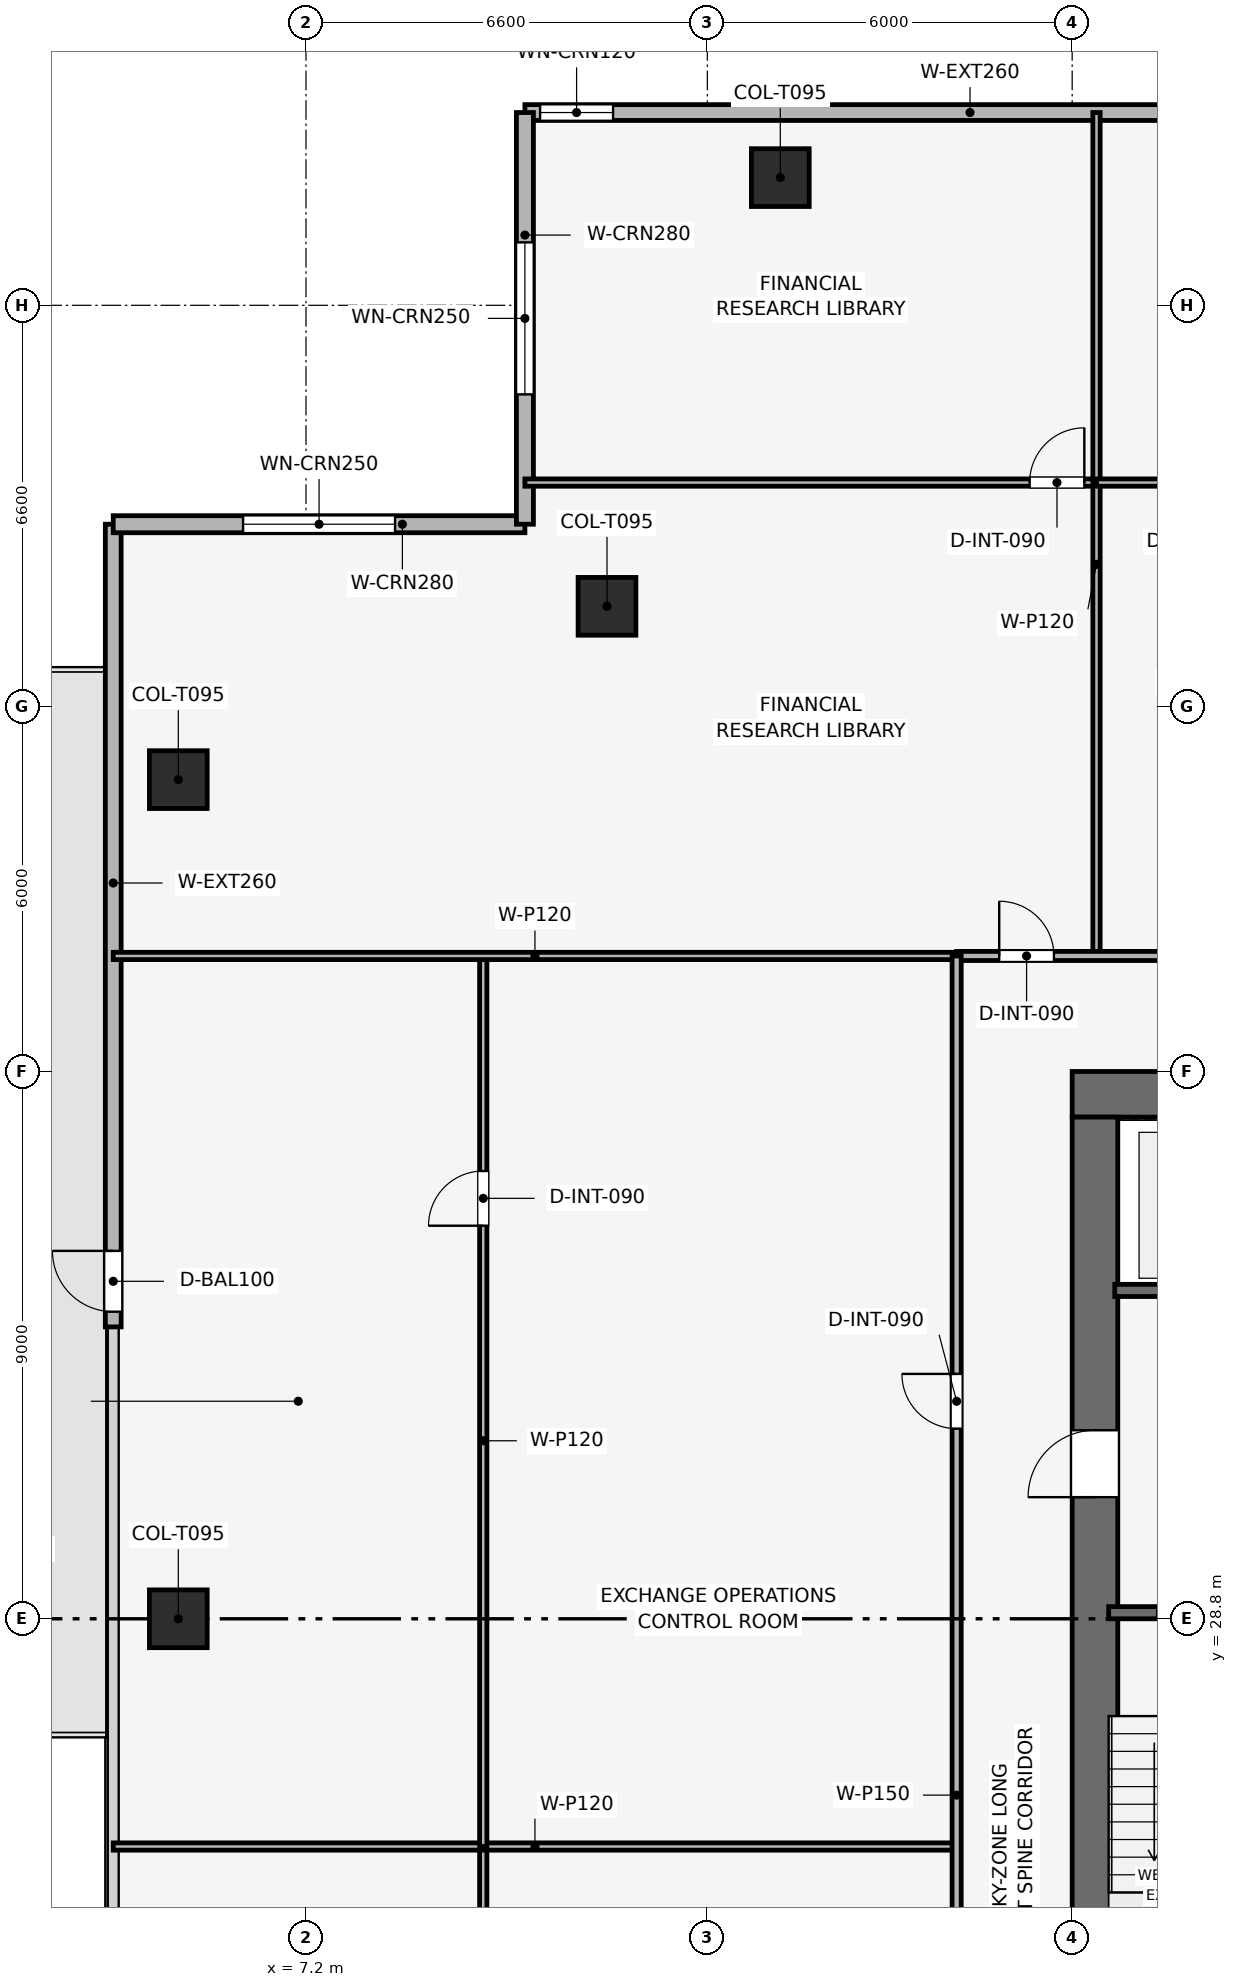
"""IFC4 building model, lengths in metres.
Left out: names, types, materials, properties, quantities, classifications, styles, units other than length and angle.
Written with IfcOpenShell. Run it as: python <this file> out.ifc"""

import sys

from ifc_helpers import new_model, si_unit, direction, frame, frame_2d, origin, origin_2d, place, context, subcontext, project, spatial, rectangle, extrude, element, fill, save


model = new_model("IFC4")
c1 = context("Model", 3, precision=1e-05, world=origin(), true_north=direction((0.0, 1.0)))
c2 = subcontext(c1, "Body", "Model", "MODEL_VIEW")
j1 = project(units=[si_unit("LENGTHUNIT", "METRE"), si_unit("PLANEANGLEUNIT", "RADIAN")], contexts=[c1])
p1 = place(None, origin())
s1 = spatial("IfcSite", under=j1, at=p1, CompositionType="ELEMENT")
p2 = place(p1, origin())
s2 = spatial("IfcBuilding", under=s1, at=p2, CompositionType="ELEMENT")
p3 = place(p2, frame((0.0, 0.0, 254.1)))
s3 = spatial("IfcBuildingStorey", under=s2, at=p3, CompositionType="ELEMENT", Elevation=254.1)
p4 = place(p3, frame((19.8, 37.425, 0.0), z_axis=(0.0, 0.0, 1.0), x_axis=(1.0, 0.0, 0.0)))
e1 = element("IfcWall", 1, at=p4, inside=s3, PredefinedType="SHEAR", context=c2, shape_type="SweptSolid", body=[
    extrude(rectangle(XDim=18.0, YDim=0.75, at=frame_2d((9.0, 0.0))), origin(), (0.0, 0.0, 1.0), 3.75),
])
p5 = place(p4, frame((7.05, 0.0, 0.0)))
e2 = element("IfcOpeningElement", 2, at=p5, cuts=e1, PredefinedType="OPENING", context=c2, shape_type="SweptSolid", body=[
    extrude(rectangle(XDim=1.1, YDim=2.15, at=frame_2d((0.55, 1.075))), frame((0.0, 0.385, 0.0), z_axis=(0.0, -1.0, 0.0), x_axis=(1.0, 0.0, 0.0)), (0.0, 0.0, 1.0), 0.77),
])
p6 = place(p3, frame((20.175, 20.55, 0.0), z_axis=(0.0, 0.0, 1.0), x_axis=(0.0, 1.0, 0.0)))
e3 = element("IfcWall", 3, at=p6, inside=s3, PredefinedType="SHEAR", context=c2, shape_type="SweptSolid", body=[
    extrude(rectangle(XDim=16.5, YDim=0.75, at=frame_2d((8.25, 0.0))), origin(), (0.0, 0.0, 1.0), 3.75),
])
p7 = place(p6, frame((10.25, 0.0, 0.0)))
e4 = element("IfcOpeningElement", 4, at=p7, cuts=e3, PredefinedType="OPENING", context=c2, shape_type="SweptSolid", body=[
    extrude(rectangle(XDim=1.1, YDim=2.15, at=frame_2d((0.55, 1.075))), frame((0.0, 0.385, 0.0), z_axis=(0.0, -1.0, 0.0), x_axis=(1.0, 0.0, 0.0)), (0.0, 0.0, 1.0), 0.77),
])
for number, where, z_axis, x_axis in (
    (5, (15.0, 52.5, 0.003), (0.0, 0.0, 1.0), (1.0, 0.0, 0.0)),
    (6, (5.1, 42.6, 0.003), (0.0, 0.0, 1.0), (1.0, 0.0, 0.0)),
    (7, (5.1, 28.8, 0.003), (0.0, 0.0, 1.0), (1.0, 0.0, 0.0)),
    (8, (12.15, 45.45, 0.003), (0.0, 0.0, 1.0), (1.0, 0.0, 0.0)),
):
    element("IfcColumn", number, at=place(p3, frame(where, z_axis=z_axis, x_axis=x_axis)), inside=s3, PredefinedType="COLUMN", context=c2, shape_type="SweptSolid", body=[
        extrude(rectangle(XDim=0.95, YDim=0.95, at=origin_2d()), origin(), (0.0, 0.0, 1.0), 3.494),
    ])
p8 = place(p3, frame((10.8, 53.57, 0.0), z_axis=(0.0, 0.0, 1.0), x_axis=(1.0, 0.0, 0.0)))
e9 = element("IfcWall", 9, at=p8, inside=s3, PredefinedType="SOLIDWALL", context=c2, shape_type="SweptSolid", body=[
    extrude(rectangle(XDim=13.2, YDim=0.26, at=frame_2d((6.6, 0.0))), origin(), (0.0, 0.0, 1.0), 3.5),
])
p9 = place(p8, frame((0.25, 0.0, 0.9)))
e10 = element("IfcOpeningElement", 10, at=p9, cuts=e9, PredefinedType="OPENING", context=c2, shape_type="SweptSolid", body=[
    extrude(rectangle(XDim=1.2, YDim=2.1, at=frame_2d((0.6, 1.05))), frame((0.0, 0.14, 0.0), z_axis=(0.0, -1.0, 0.0), x_axis=(1.0, 0.0, 0.0)), (0.0, 0.0, 1.0), 0.28),
])
p10 = place(p3, frame((4.03, 33.6, 0.0), z_axis=(0.0, 0.0, 1.0), x_axis=(0.0, 1.0, 0.0)))
e11 = element("IfcWall", 11, at=p10, inside=s3, PredefinedType="SOLIDWALL", context=c2, shape_type="SweptSolid", body=[
    extrude(rectangle(XDim=13.2, YDim=0.26, at=frame_2d((6.6, 0.0))), origin(), (0.0, 0.0, 1.0), 3.5),
])
p11 = place(p10, frame((0.25, 0.0, 0.0)))
e12 = element("IfcOpeningElement", 12, at=p11, cuts=e11, PredefinedType="OPENING", context=c2, shape_type="SweptSolid", body=[
    extrude(rectangle(XDim=1.0, YDim=2.2, at=frame_2d((0.5, 1.1))), frame((0.0, 0.14, 0.0), z_axis=(0.0, -1.0, 0.0), x_axis=(1.0, 0.0, 0.0)), (0.0, 0.0, 1.0), 0.28),
])
p12 = place(p3, frame((4.03, 46.8, 0.0), z_axis=(0.0, 0.0, 1.0), x_axis=(1.0, 0.0, 0.0)))
e13 = element("IfcWall", 13, at=p12, inside=s3, PredefinedType="SOLIDWALL", context=c2, shape_type="SweptSolid", body=[
    extrude(rectangle(XDim=6.77, YDim=0.28, at=frame_2d((3.385, 0.0))), origin(), (0.0, 0.0, 1.0), 3.5),
])
p13 = place(p12, frame((2.135, 0.0, 0.9)))
e14 = element("IfcOpeningElement", 14, at=p13, cuts=e13, PredefinedType="OPENING", context=c2, shape_type="SweptSolid", body=[
    extrude(rectangle(XDim=2.5, YDim=1.9, at=frame_2d((1.25, 0.95))), frame((0.0, 0.15, 0.0), z_axis=(0.0, -1.0, 0.0), x_axis=(1.0, 0.0, 0.0)), (0.0, 0.0, 1.0), 0.3),
])
p14 = place(p3, frame((10.8, 46.8, 0.0), z_axis=(0.0, 0.0, 1.0), x_axis=(0.0, 1.0, 0.0)))
e15 = element("IfcWall", 15, at=p14, inside=s3, PredefinedType="SOLIDWALL", context=c2, shape_type="SweptSolid", body=[
    extrude(rectangle(XDim=6.77, YDim=0.28, at=frame_2d((3.385, 0.0))), origin(), (0.0, 0.0, 1.0), 3.5),
])
p15 = place(p14, frame((2.135, 0.0, 0.9)))
e16 = element("IfcOpeningElement", 16, at=p15, cuts=e15, PredefinedType="OPENING", context=c2, shape_type="SweptSolid", body=[
    extrude(rectangle(XDim=2.5, YDim=1.9, at=frame_2d((1.25, 0.95))), frame((0.0, 0.15, 0.0), z_axis=(0.0, -1.0, 0.0), x_axis=(1.0, 0.0, 0.0)), (0.0, 0.0, 1.0), 0.3),
])
p16 = place(p3, frame((20.4, 28.9, 0.0), z_axis=(0.0, 0.0, 1.0), x_axis=(1.0, 0.0, 0.0)))
e17 = element("IfcWall", 17, at=p16, inside=s3, PredefinedType="SHEAR", context=c2, shape_type="SweptSolid", body=[
    extrude(rectangle(XDim=3.15, YDim=0.2, at=frame_2d((1.575, 0.0))), origin(), (0.0, 0.0, 1.0), 3.5),
])
p17 = place(p16, frame((0.8, 0.0, 0.0)))
e18 = element("IfcOpeningElement", 18, at=p17, cuts=e17, PredefinedType="OPENING", context=c2, shape_type="SweptSolid", body=[
    extrude(rectangle(XDim=1.0, YDim=2.1, at=frame_2d((0.5, 1.05))), frame((0.0, 0.11, 0.0), z_axis=(0.0, -1.0, 0.0), x_axis=(1.0, 0.0, 0.0)), (0.0, 0.0, 1.0), 0.22),
])
p18 = place(p3, frame((20.5, 34.2, 0.0), z_axis=(0.0, 0.0, 1.0), x_axis=(1.0, 0.0, 0.0)))
e19 = element("IfcWall", 19, at=p18, inside=s3, PredefinedType="SHEAR", context=c2, shape_type="SweptSolid", body=[
    extrude(rectangle(XDim=3.05, YDim=0.2, at=frame_2d((1.525, 0.0))), origin(), (0.0, 0.0, 1.0), 3.5),
])
p19 = place(p18, frame((0.75, 0.0, 0.0)))
e20 = element("IfcOpeningElement", 20, at=p19, cuts=e19, PredefinedType="OPENING", context=c2, shape_type="SweptSolid", body=[
    extrude(rectangle(XDim=1.1, YDim=2.15, at=frame_2d((0.55, 1.075))), frame((0.0, 0.11, 0.0), z_axis=(0.0, -1.0, 0.0), x_axis=(1.0, 0.0, 0.0)), (0.0, 0.0, 1.0), 0.22),
])
p20 = place(p3, frame((10.8, 47.485, 0.0), z_axis=(0.0, 0.0, 1.0), x_axis=(1.0, 0.0, 0.0)))
e21 = element("IfcWall", 21, at=p20, inside=s3, PredefinedType="PARTITIONING", context=c2, shape_type="SweptSolid", body=[
    extrude(rectangle(XDim=9.4, YDim=0.12, at=frame_2d((4.7, 0.0))), origin(), (0.0, 0.0, 1.0), 3.085),
])
p21 = place(p20, frame((8.3, 0.0, 0.0)))
e22 = element("IfcOpeningElement", 22, at=p21, cuts=e21, PredefinedType="OPENING", context=c2, shape_type="SweptSolid", body=[
    extrude(rectangle(XDim=0.9, YDim=2.1, at=frame_2d((0.45, 1.05))), frame((0.0, 0.07, 0.0), z_axis=(0.0, -1.0, 0.0), x_axis=(1.0, 0.0, 0.0)), (0.0, 0.0, 1.0), 0.14),
])
p22 = place(p3, frame((20.2, 39.7, 0.0), z_axis=(0.0, 0.0, 1.0), x_axis=(0.0, 1.0, 0.0)))
e23 = element("IfcWall", 23, at=p22, inside=s3, PredefinedType="PARTITIONING", context=c2, shape_type="SweptSolid", body=[
    extrude(rectangle(XDim=13.87, YDim=0.12, at=frame_2d((6.935, 0.0))), origin(), (0.0, 0.0, 1.0), 3.085),
])
p23 = place(p3, frame((20.2, 47.485, 0.0), z_axis=(0.0, 0.0, 1.0), x_axis=(1.0, 0.0, 0.0)))
e24 = element("IfcWall", 24, at=p23, inside=s3, PredefinedType="PARTITIONING", context=c2, shape_type="SweptSolid", body=[
    extrude(rectangle(XDim=5.902, YDim=0.12, at=frame_2d((2.951, 0.0))), origin(), (0.0, 0.0, 1.0), 3.085),
])
p24 = place(p23, frame((1.159, 0.0, 0.0)))
e25 = element("IfcOpeningElement", 25, at=p24, cuts=e24, PredefinedType="OPENING", context=c2, shape_type="SweptSolid", body=[
    extrude(rectangle(XDim=0.9, YDim=2.1, at=frame_2d((0.45, 1.05))), frame((0.0, 0.07, 0.0), z_axis=(0.0, -1.0, 0.0), x_axis=(1.0, 0.0, 0.0)), (0.0, 0.0, 1.0), 0.14),
])
p25 = place(p3, frame((10.115, 13.1, 0.0), z_axis=(0.0, 0.0, 1.0), x_axis=(0.0, 1.0, 0.0)))
e26 = element("IfcWall", 26, at=p25, inside=s3, PredefinedType="PARTITIONING", context=c2, shape_type="SweptSolid", body=[
    extrude(rectangle(XDim=11.955, YDim=0.12, at=frame_2d((5.978, 0.0))), origin(), (0.0, 0.0, 1.0), 3.085),
])
p26 = place(p25, frame((8.191, 0.0, 0.0)))
e27 = element("IfcOpeningElement", 27, at=p26, cuts=e26, PredefinedType="OPENING", context=c2, shape_type="SweptSolid", body=[
    extrude(rectangle(XDim=0.9, YDim=2.1, at=frame_2d((0.45, 1.05))), frame((0.0, 0.07, 0.0), z_axis=(0.0, -1.0, 0.0), x_axis=(1.0, 0.0, 0.0)), (0.0, 0.0, 1.0), 0.14),
])
p27 = place(p3, frame((4.03, 25.055, 0.0), z_axis=(0.0, 0.0, 1.0), x_axis=(1.0, 0.0, 0.0)))
e28 = element("IfcWall", 28, at=p27, inside=s3, PredefinedType="PARTITIONING", context=c2, shape_type="SweptSolid", body=[
    extrude(rectangle(XDim=13.87, YDim=0.12, at=frame_2d((6.935, 0.0))), origin(), (0.0, 0.0, 1.0), 3.085),
])
p28 = place(p3, frame((10.115, 25.055, 0.0), z_axis=(0.0, 0.0, 1.0), x_axis=(0.0, 1.0, 0.0)))
e29 = element("IfcWall", 29, at=p28, inside=s3, PredefinedType="PARTITIONING", context=c2, shape_type="SweptSolid", body=[
    extrude(rectangle(XDim=14.645, YDim=0.12, at=frame_2d((7.323, 0.0))), origin(), (0.0, 0.0, 1.0), 3.085),
])
p29 = place(p28, frame((10.209, 0.0, 0.0)))
e30 = element("IfcOpeningElement", 30, at=p29, cuts=e29, PredefinedType="OPENING", context=c2, shape_type="SweptSolid", body=[
    extrude(rectangle(XDim=0.9, YDim=2.1, at=frame_2d((0.45, 1.05))), frame((0.0, 0.07, 0.0), z_axis=(0.0, -1.0, 0.0), x_axis=(1.0, 0.0, 0.0)), (0.0, 0.0, 1.0), 0.14),
])
p30 = place(p3, frame((4.03, 39.7, 0.0), z_axis=(0.0, 0.0, 1.0), x_axis=(1.0, 0.0, 0.0)))
e31 = element("IfcWall", 31, at=p30, inside=s3, PredefinedType="PARTITIONING", context=c2, shape_type="SweptSolid", body=[
    extrude(rectangle(XDim=13.87, YDim=0.12, at=frame_2d((6.935, 0.0))), origin(), (0.0, 0.0, 1.0), 3.085),
])
p31 = place(p3, frame((17.9, 39.7, 0.0), z_axis=(0.0, 0.0, 1.0), x_axis=(1.0, 0.0, 0.0)))
e32 = element("IfcWall", 32, at=p31, inside=s3, PredefinedType="PARTITIONING", context=c2, shape_type="SweptSolid", body=[
    extrude(rectangle(XDim=21.8, YDim=0.15, at=frame_2d((10.9, 0.0))), origin(), (0.0, 0.0, 1.0), 3.085),
])
p32 = place(p31, frame((0.7, 0.0, 0.0)))
e33 = element("IfcOpeningElement", 33, at=p32, cuts=e32, PredefinedType="OPENING", context=c2, shape_type="SweptSolid", body=[
    extrude(rectangle(XDim=0.9, YDim=2.1, at=frame_2d((0.45, 1.05))), frame((0.0, 0.085, 0.0), z_axis=(0.0, -1.0, 0.0), x_axis=(1.0, 0.0, 0.0)), (0.0, 0.0, 1.0), 0.17),
])
p33 = place(p31, frame((4.801, 0.0, 0.0)))
e34 = element("IfcOpeningElement", 34, at=p33, cuts=e32, PredefinedType="OPENING", context=c2, shape_type="SweptSolid", body=[
    extrude(rectangle(XDim=0.9, YDim=2.1, at=frame_2d((0.45, 1.05))), frame((0.0, 0.085, 0.0), z_axis=(0.0, -1.0, 0.0), x_axis=(1.0, 0.0, 0.0)), (0.0, 0.0, 1.0), 0.17),
])
p34 = place(p31, frame((10.535, 0.0, 0.0)))
e35 = element("IfcOpeningElement", 35, at=p34, cuts=e32, PredefinedType="OPENING", context=c2, shape_type="SweptSolid", body=[
    extrude(rectangle(XDim=0.9, YDim=2.1, at=frame_2d((0.45, 1.05))), frame((0.0, 0.085, 0.0), z_axis=(0.0, -1.0, 0.0), x_axis=(1.0, 0.0, 0.0)), (0.0, 0.0, 1.0), 0.17),
])
p35 = place(p31, frame((17.334, 0.0, 0.0)))
e36 = element("IfcOpeningElement", 36, at=p35, cuts=e32, PredefinedType="OPENING", context=c2, shape_type="SweptSolid", body=[
    extrude(rectangle(XDim=0.9, YDim=2.1, at=frame_2d((0.45, 1.05))), frame((0.0, 0.085, 0.0), z_axis=(0.0, -1.0, 0.0), x_axis=(1.0, 0.0, 0.0)), (0.0, 0.0, 1.0), 0.17),
])
p36 = place(p3, frame((17.9, 10.8, 0.0), z_axis=(0.0, 0.0, 1.0), x_axis=(0.0, 1.0, 0.0)))
e37 = element("IfcWall", 37, at=p36, inside=s3, PredefinedType="PARTITIONING", context=c2, shape_type="SweptSolid", body=[
    extrude(rectangle(XDim=28.9, YDim=0.15, at=frame_2d((14.45, 0.0))), origin(), (0.0, 0.0, 1.0), 3.085),
])
p37 = place(p36, frame((0.7, 0.0, 0.0)))
e38 = element("IfcOpeningElement", 38, at=p37, cuts=e37, PredefinedType="OPENING", context=c2, shape_type="SweptSolid", body=[
    extrude(rectangle(XDim=0.9, YDim=2.1, at=frame_2d((0.45, 1.05))), frame((0.0, 0.085, 0.0), z_axis=(0.0, -1.0, 0.0), x_axis=(1.0, 0.0, 0.0)), (0.0, 0.0, 1.0), 0.17),
])
p38 = place(p36, frame((7.828, 0.0, 0.0)))
e39 = element("IfcOpeningElement", 39, at=p38, cuts=e37, PredefinedType="OPENING", context=c2, shape_type="SweptSolid", body=[
    extrude(rectangle(XDim=0.9, YDim=2.1, at=frame_2d((0.45, 1.05))), frame((0.0, 0.085, 0.0), z_axis=(0.0, -1.0, 0.0), x_axis=(1.0, 0.0, 0.0)), (0.0, 0.0, 1.0), 0.17),
])
p39 = place(p36, frame((21.127, 0.0, 0.0)))
e40 = element("IfcOpeningElement", 40, at=p39, cuts=e37, PredefinedType="OPENING", context=c2, shape_type="SweptSolid", body=[
    extrude(rectangle(XDim=0.9, YDim=2.1, at=frame_2d((0.45, 1.05))), frame((0.0, 0.085, 0.0), z_axis=(0.0, -1.0, 0.0), x_axis=(1.0, 0.0, 0.0)), (0.0, 0.0, 1.0), 0.17),
])
p40 = place(p9, origin())
e41 = element("IfcWindow", 41, at=p40, inside=s3, PartitioningType="SINGLE_PANEL", PredefinedType="WINDOW", context=c2, shape_type="SweptSolid", body=[
    extrude(rectangle(XDim=1.2, YDim=2.1, at=frame_2d((0.6, 1.05))), frame((0.0, 0.03, 0.0), z_axis=(0.0, -1.0, 0.0), x_axis=(1.0, 0.0, 0.0)), (0.0, 0.0, 1.0), 0.06),
])
fill(e10, e41)
p41 = place(p11, origin())
e42 = element("IfcDoor", 42, at=p41, inside=s3, OperationType="SINGLE_SWING_RIGHT", PredefinedType="DOOR", context=c2, shape_type="SweptSolid", body=[
    extrude(rectangle(XDim=1.0, YDim=2.2, at=frame_2d((0.5, 1.1))), frame((0.0, 0.025, 0.0), z_axis=(0.0, -1.0, 0.0), x_axis=(1.0, 0.0, 0.0)), (0.0, 0.0, 1.0), 0.05),
])
fill(e12, e42)
p42 = place(p13, origin())
e43 = element("IfcWindow", 43, at=p42, inside=s3, PartitioningType="SINGLE_PANEL", PredefinedType="WINDOW", context=c2, shape_type="SweptSolid", body=[
    extrude(rectangle(XDim=2.5, YDim=1.9, at=frame_2d((1.25, 0.95))), frame((0.0, 0.03, 0.0), z_axis=(0.0, -1.0, 0.0), x_axis=(1.0, 0.0, 0.0)), (0.0, 0.0, 1.0), 0.06),
])
fill(e14, e43)
p43 = place(p15, origin())
e44 = element("IfcWindow", 44, at=p43, inside=s3, PartitioningType="SINGLE_PANEL", PredefinedType="WINDOW", context=c2, shape_type="SweptSolid", body=[
    extrude(rectangle(XDim=2.5, YDim=1.9, at=frame_2d((1.25, 0.95))), frame((0.0, 0.03, 0.0), z_axis=(0.0, -1.0, 0.0), x_axis=(1.0, 0.0, 0.0)), (0.0, 0.0, 1.0), 0.06),
])
fill(e16, e44)
p44 = place(p21, origin())
e45 = element("IfcDoor", 45, at=p44, inside=s3, OperationType="SINGLE_SWING_RIGHT", PredefinedType="DOOR", context=c2, shape_type="SweptSolid", body=[
    extrude(rectangle(XDim=0.9, YDim=2.1, at=frame_2d((0.45, 1.05))), frame((0.0, 0.025, 0.0), z_axis=(0.0, -1.0, 0.0), x_axis=(1.0, 0.0, 0.0)), (0.0, 0.0, 1.0), 0.05),
])
fill(e22, e45)
p45 = place(p29, origin())
e46 = element("IfcDoor", 46, at=p45, inside=s3, OperationType="SINGLE_SWING_LEFT", PredefinedType="DOOR", context=c2, shape_type="SweptSolid", body=[
    extrude(rectangle(XDim=0.9, YDim=2.1, at=frame_2d((0.45, 1.05))), frame((0.0, 0.025, 0.0), z_axis=(0.0, -1.0, 0.0), x_axis=(1.0, 0.0, 0.0)), (0.0, 0.0, 1.0), 0.05),
])
fill(e30, e46)
p46 = place(p32, origin())
e47 = element("IfcDoor", 47, at=p46, inside=s3, OperationType="SINGLE_SWING_LEFT", PredefinedType="DOOR", context=c2, shape_type="SweptSolid", body=[
    extrude(rectangle(XDim=0.9, YDim=2.1, at=frame_2d((0.45, 1.05))), frame((0.0, 0.025, 0.0), z_axis=(0.0, -1.0, 0.0), x_axis=(1.0, 0.0, 0.0)), (0.0, 0.0, 1.0), 0.05),
])
fill(e33, e47)
p47 = place(p39, origin())
e48 = element("IfcDoor", 48, at=p47, inside=s3, OperationType="SINGLE_SWING_RIGHT", PredefinedType="DOOR", context=c2, shape_type="SweptSolid", body=[
    extrude(rectangle(XDim=0.9, YDim=2.1, at=frame_2d((0.45, 1.05))), frame((0.0, 0.025, 0.0), z_axis=(0.0, -1.0, 0.0), x_axis=(1.0, 0.0, 0.0)), (0.0, 0.0, 1.0), 0.05),
])
fill(e40, e48)
p48 = place(p7, origin())
e49 = element("IfcDoor", 49, at=p48, inside=s3, OperationType="SINGLE_SWING_LEFT", PredefinedType="DOOR", context=c2, shape_type="SweptSolid", body=[
    extrude(rectangle(XDim=1.1, YDim=2.15, at=frame_2d((0.55, 1.075))), frame((0.0, 0.025, 0.0), z_axis=(0.0, -1.0, 0.0), x_axis=(1.0, 0.0, 0.0)), (0.0, 0.0, 1.0), 0.05),
])
fill(e4, e49)
save(model, sys.argv[1])
